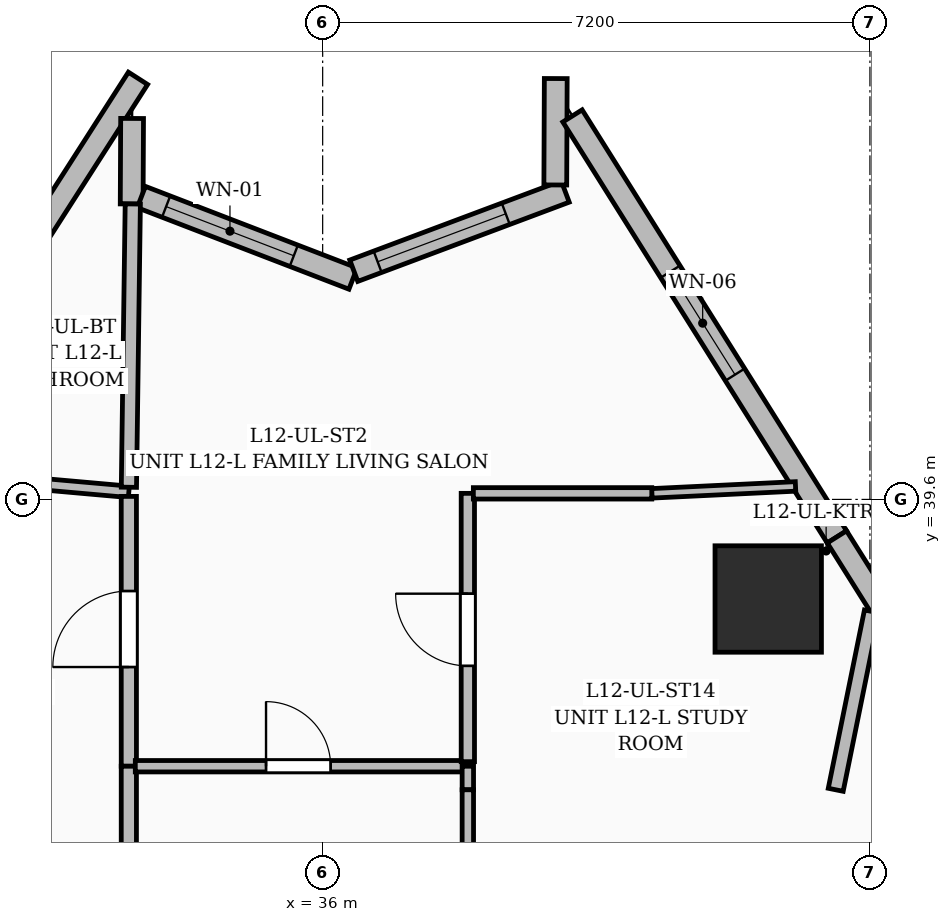
"""IFC4 building model, lengths in metres.
Left out: names, types, materials, properties, quantities, classifications, styles, units other than length and angle.
Written with IfcOpenShell. Run it as: python <this file> out.ifc"""

import sys

from ifc_helpers import new_model, si_unit, direction, frame, frame_2d, origin, origin_2d, place, context, subcontext, project, spatial, rectangle, extrude, element, fill, save


model = new_model("IFC4")
c1 = context("Model", 3, precision=1e-05, world=origin(), true_north=direction((0.0, 1.0)))
c2 = subcontext(c1, "Body", "Model", "MODEL_VIEW")
j1 = project(units=[si_unit("LENGTHUNIT", "METRE"), si_unit("PLANEANGLEUNIT", "RADIAN")], contexts=[c1])
p1 = place(None, origin())
s1 = spatial("IfcSite", under=j1, at=p1, CompositionType="ELEMENT")
p2 = place(p1, origin())
s2 = spatial("IfcBuilding", under=s1, at=p2, CompositionType="ELEMENT")
p3 = place(p2, frame((0.0, 0.0, 53.4)))
s3 = spatial("IfcBuildingStorey", under=s2, at=p3, CompositionType="ELEMENT", Elevation=53.4)
p4 = place(p3, frame((41.862, 38.29, 0.0), z_axis=(0.0, 0.0, 1.0), x_axis=(1.0, 0.0, 0.0)))
e1 = element("IfcColumn", 1, at=p4, inside=s3, PredefinedType="COLUMN", context=c2, shape_type="SweptSolid", body=[
    extrude(rectangle(XDim=1.4, YDim=1.4, at=origin_2d()), origin(), (0.0, 0.0, 1.0), 3.6),
])
p5 = place(p3, frame((29.713, 39.121, 0.0), z_axis=(0.0, 0.0, 1.0), x_axis=(0.539533296006, 0.841964264385, 0.0)))
e2 = element("IfcWall", 2, at=p5, inside=s3, PredefinedType="SOLIDWALL", context=c2, shape_type="SweptSolid", body=[
    extrude(rectangle(XDim=7.149, YDim=0.3, at=frame_2d((3.575, 0.0))), origin(), (0.0, 0.0, 1.0), 3.35),
])
p6 = place(p5, frame((2.65, 0.0, 0.6)))
e3 = element("IfcOpeningElement", 3, at=p6, cuts=e2, PredefinedType="OPENING", context=c2, shape_type="SweptSolid", body=[
    extrude(rectangle(XDim=1.5, YDim=2.1, at=frame_2d((0.75, 1.05))), frame((0.0, 0.16, 0.0), z_axis=(0.0, -1.0, 0.0), x_axis=(1.0, 0.0, 0.0)), (0.0, 0.0, 1.0), 0.32),
])
p7 = place(p3, frame((33.493, 44.612, 0.0), z_axis=(0.0, 0.0, 1.0), x_axis=(-0.004991257271, -0.999987543598, 0.0)))
e4 = element("IfcWall", 4, at=p7, inside=s3, PredefinedType="SOLIDWALL", context=c2, shape_type="SweptSolid", body=[
    extrude(rectangle(XDim=1.125, YDim=0.3, at=frame_2d((0.562, 0.0))), origin(), (0.0, 0.0, 1.0), 3.35),
])
p8 = place(p3, frame((33.614, 43.579, 0.0), z_axis=(0.0, 0.0, 1.0), x_axis=(0.933166321884, -0.359444871576, 0.0)))
e5 = element("IfcWall", 5, at=p8, inside=s3, PredefinedType="SOLIDWALL", context=c2, shape_type="SweptSolid", body=[
    extrude(rectangle(XDim=2.985, YDim=0.3, at=frame_2d((1.493, 0.0))), origin(), (0.0, 0.0, 1.0), 3.35),
])
p9 = place(p8, frame((0.35, 0.0, 0.6)))
e6 = element("IfcOpeningElement", 6, at=p9, cuts=e5, PredefinedType="OPENING", context=c2, shape_type="SweptSolid", body=[
    extrude(rectangle(XDim=1.8, YDim=2.1, at=frame_2d((0.9, 1.05))), frame((0.0, 0.16, 0.0), z_axis=(0.0, -1.0, 0.0), x_axis=(1.0, 0.0, 0.0)), (0.0, 0.0, 1.0), 0.32),
])
p10 = place(p3, frame((36.409, 42.609, 0.0), z_axis=(0.0, 0.0, 1.0), x_axis=(0.936403459864, 0.350925291699, 0.0)))
e7 = element("IfcWall", 7, at=p10, inside=s3, PredefinedType="SOLIDWALL", context=c2, shape_type="SweptSolid", body=[
    extrude(rectangle(XDim=2.971, YDim=0.3, at=frame_2d((1.485, 0.0))), origin(), (0.0, 0.0, 1.0), 3.35),
])
p11 = place(p10, frame((0.335, 0.0, 0.6)))
e8 = element("IfcOpeningElement", 8, at=p11, cuts=e7, PredefinedType="OPENING", context=c2, shape_type="SweptSolid", body=[
    extrude(rectangle(XDim=1.8, YDim=2.1, at=frame_2d((0.9, 1.05))), frame((0.0, 0.16, 0.0), z_axis=(0.0, -1.0, 0.0), x_axis=(1.0, 0.0, 0.0)), (0.0, 0.0, 1.0), 0.32),
])
p12 = place(p3, frame((39.061, 43.737, 0.0), z_axis=(0.0, 0.0, 1.0), x_axis=(0.004359916705, 0.999990495518, 0.0)))
e9 = element("IfcWall", 9, at=p12, inside=s3, PredefinedType="SOLIDWALL", context=c2, shape_type="SweptSolid", body=[
    extrude(rectangle(XDim=1.4, YDim=0.3, at=frame_2d((0.7, 0.0))), origin(), (0.0, 0.0, 1.0), 3.35),
])
p13 = place(p3, frame((39.287, 44.646, 0.0), z_axis=(0.0, 0.0, 1.0), x_axis=(0.531900124003, -0.846807096147, 0.0)))
e10 = element("IfcWall", 10, at=p13, inside=s3, PredefinedType="SOLIDWALL", context=c2, shape_type="SweptSolid", body=[
    extrude(rectangle(XDim=6.54, YDim=0.3, at=frame_2d((3.27, 0.0))), origin(), (0.0, 0.0, 1.0), 3.35),
])
p14 = place(p13, frame((2.42, 0.0, 0.55)))
e11 = element("IfcOpeningElement", 11, at=p14, cuts=e10, PredefinedType="OPENING", context=c2, shape_type="SweptSolid", body=[
    extrude(rectangle(XDim=1.6, YDim=2.2, at=frame_2d((0.8, 1.1))), frame((0.0, 0.16, 0.0), z_axis=(0.0, -1.0, 0.0), x_axis=(1.0, 0.0, 0.0)), (0.0, 0.0, 1.0), 0.32),
])
p15 = place(p3, frame((42.765, 39.107, 0.0), z_axis=(0.0, 0.0, 1.0), x_axis=(0.531921360547, -0.846793756586, 0.0)))
e12 = element("IfcWall", 12, at=p15, inside=s3, PredefinedType="SOLIDWALL", context=c2, shape_type="SweptSolid", body=[
    extrude(rectangle(XDim=7.095, YDim=0.3, at=frame_2d((3.548, 0.0))), origin(), (0.0, 0.0, 1.0), 3.35),
])
p16 = place(p15, frame((5.175, 0.0, 0.8)))
e13 = element("IfcOpeningElement", 13, at=p16, cuts=e12, PredefinedType="OPENING", context=c2, shape_type="SweptSolid", body=[
    extrude(rectangle(XDim=1.2, YDim=1.8, at=frame_2d((0.6, 0.9))), frame((0.0, 0.16, 0.0), z_axis=(0.0, -1.0, 0.0), x_axis=(1.0, 0.0, 0.0)), (0.0, 0.0, 1.0), 0.32),
])
p17 = place(p3, frame((33.45, 39.7, 0.0), z_axis=(0.0, 0.0, 1.0), x_axis=(-0.996078574379, 0.088473010928, 0.0)))
e14 = element("IfcWall", 14, at=p17, inside=s3, PredefinedType="PARTITIONING", context=c2, shape_type="SweptSolid", body=[
    extrude(rectangle(XDim=3.063, YDim=0.15, at=frame_2d((1.531, 0.0))), origin(), (0.0, 0.0, 1.0), 3.35),
])
p18 = place(p17, frame((1.178, 0.0, 0.0)))
e15 = element("IfcOpeningElement", 15, at=p18, cuts=e14, PredefinedType="OPENING", context=c2, shape_type="SweptSolid", body=[
    extrude(rectangle(XDim=0.85, YDim=2.1, at=frame_2d((0.425, 1.05))), frame((0.0, 0.085, 0.0), z_axis=(0.0, -1.0, 0.0), x_axis=(1.0, 0.0, 0.0)), (0.0, 0.0, 1.0), 0.17),
])
p19 = place(p3, frame((33.45, 36.09, 0.0), z_axis=(0.0, 0.0, 1.0), x_axis=(0.0, 1.0, 0.0)))
e16 = element("IfcWall", 16, at=p19, inside=s3, PredefinedType="PARTITIONING", context=c2, shape_type="SweptSolid", body=[
    extrude(rectangle(XDim=3.55, YDim=0.2, at=frame_2d((1.775, 0.0))), origin(), (0.0, 0.0, 1.0), 2.37),
])
p20 = place(p19, frame((1.305, 0.0, 0.0)))
e17 = element("IfcOpeningElement", 17, at=p20, cuts=e16, PredefinedType="OPENING", context=c2, shape_type="SweptSolid", body=[
    extrude(rectangle(XDim=1.0, YDim=2.2, at=frame_2d((0.5, 1.1))), frame((0.0, 0.11, 0.0), z_axis=(0.0, -1.0, 0.0), x_axis=(1.0, 0.0, 0.0)), (0.0, 0.0, 1.0), 0.22),
])
p21 = place(p3, frame((33.45, 34.927, 0.0), z_axis=(0.0, 0.0, 1.0), x_axis=(0.0, 1.0, 0.0)))
e18 = element("IfcWall", 18, at=p21, inside=s3, PredefinedType="PARTITIONING", context=c2, shape_type="SweptSolid", body=[
    extrude(rectangle(XDim=1.163, YDim=0.2, at=frame_2d((0.581, 0.0))), origin(), (0.0, 0.0, 1.0), 3.35),
])
p22 = place(p3, frame((33.451, 39.76, 0.0), z_axis=(0.0, 0.0, 1.0), x_axis=(0.013754757877, 0.999905398843, 0.0)))
e19 = element("IfcWall", 19, at=p22, inside=s3, PredefinedType="PARTITIONING", context=c2, shape_type="SweptSolid", body=[
    extrude(rectangle(XDim=3.727, YDim=0.2, at=frame_2d((1.864, 0.0))), origin(), (0.0, 0.0, 1.0), 3.35),
])
p23 = place(p3, frame((43.226, 38.126, 0.0), z_axis=(0.0, 0.0, 1.0), x_axis=(-0.198880858248, -0.980023675338, 0.0)))
e20 = element("IfcWall", 20, at=p23, inside=s3, PredefinedType="PARTITIONING", context=c2, shape_type="SweptSolid", body=[
    extrude(rectangle(XDim=2.394, YDim=0.2, at=frame_2d((1.197, 0.0))), origin(), (0.0, 0.0, 1.0), 2.37),
])
p24 = place(p3, frame((33.535, 36.09, 0.0), z_axis=(0.0, 0.0, 1.0), x_axis=(1.0, 0.0, 0.0)))
e21 = element("IfcWall", 21, at=p24, inside=s3, PredefinedType="PARTITIONING", context=c2, shape_type="SweptSolid", body=[
    extrude(rectangle(XDim=4.375, YDim=0.15, at=frame_2d((2.188, 0.0))), origin(), (0.0, 0.0, 1.0), 3.35),
])
p25 = place(p24, frame((1.72, 0.0, 0.0)))
e22 = element("IfcOpeningElement", 22, at=p25, cuts=e21, PredefinedType="OPENING", context=c2, shape_type="SweptSolid", body=[
    extrude(rectangle(XDim=0.85, YDim=2.1, at=frame_2d((0.425, 1.05))), frame((0.0, 0.085, 0.0), z_axis=(0.0, -1.0, 0.0), x_axis=(1.0, 0.0, 0.0)), (0.0, 0.0, 1.0), 0.17),
])
p26 = place(p3, frame((40.33, 39.68, 0.0), z_axis=(0.0, 0.0, 1.0), x_axis=(0.998842315683, 0.048104349096, 0.0)))
e23 = element("IfcWall", 23, at=p26, inside=s3, PredefinedType="PARTITIONING", context=c2, shape_type="SweptSolid", body=[
    extrude(rectangle(XDim=1.893, YDim=0.125, at=frame_2d((0.947, 0.0))), origin(), (0.0, 0.0, 1.0), 3.35),
])
p27 = place(p3, frame((37.91, 36.15, 0.0), z_axis=(0.0, 0.0, 1.0), x_axis=(0.0, 1.0, 0.0)))
e24 = element("IfcWall", 24, at=p27, inside=s3, PredefinedType="PARTITIONING", context=c2, shape_type="SweptSolid", body=[
    extrude(rectangle(XDim=3.53, YDim=0.175, at=frame_2d((1.765, 0.0))), origin(), (0.0, 0.0, 1.0), 2.37),
])
p28 = place(p27, frame((1.26, 0.0, 0.0)))
e25 = element("IfcOpeningElement", 25, at=p28, cuts=e24, PredefinedType="OPENING", context=c2, shape_type="SweptSolid", body=[
    extrude(rectangle(XDim=0.95, YDim=2.2, at=frame_2d((0.475, 1.1))), frame((0.0, 0.097, 0.0), z_axis=(0.0, -1.0, 0.0), x_axis=(1.0, 0.0, 0.0)), (0.0, 0.0, 1.0), 0.195),
])
p29 = place(p3, frame((37.982, 39.68, 0.0), z_axis=(0.0, 0.0, 1.0), x_axis=(1.0, 0.0, 0.0)))
e26 = element("IfcWall", 26, at=p29, inside=s3, PredefinedType="PARTITIONING", context=c2, shape_type="SweptSolid", body=[
    extrude(rectangle(XDim=2.348, YDim=0.15, at=frame_2d((1.174, 0.0))), origin(), (0.0, 0.0, 1.0), 3.35),
])
p30 = place(p3, frame((37.91, 35.78, 0.0), z_axis=(0.0, 0.0, 1.0), x_axis=(0.0, 1.0, 0.0)))
e27 = element("IfcWall", 27, at=p30, inside=s3, PredefinedType="PARTITIONING", context=c2, shape_type="SweptSolid", body=[
    extrude(rectangle(XDim=0.31, YDim=0.15, at=frame_2d((0.155, 0.0))), origin(), (0.0, 0.0, 1.0), 3.35),
])
p31 = place(p3, frame((37.91, 33.82, 0.0), z_axis=(0.0, 0.0, 1.0), x_axis=(0.0, 1.0, 0.0)))
e28 = element("IfcWall", 28, at=p31, inside=s3, PredefinedType="PARTITIONING", context=c2, shape_type="SweptSolid", body=[
    extrude(rectangle(XDim=1.96, YDim=0.15, at=frame_2d((0.98, 0.0))), origin(), (0.0, 0.0, 1.0), 3.01),
])
p32 = place(p9, origin())
e29 = element("IfcWindow", 29, at=p32, inside=s3, PartitioningType="SINGLE_PANEL", PredefinedType="WINDOW", context=c2, shape_type="SweptSolid", body=[
    extrude(rectangle(XDim=1.8, YDim=2.1, at=frame_2d((0.9, 1.05))), frame((0.0, 0.03, 0.0), z_axis=(0.0, -1.0, 0.0), x_axis=(1.0, 0.0, 0.0)), (0.0, 0.0, 1.0), 0.06),
])
fill(e6, e29)
p33 = place(p11, origin())
e30 = element("IfcWindow", 30, at=p33, inside=s3, PartitioningType="SINGLE_PANEL", PredefinedType="WINDOW", context=c2, shape_type="SweptSolid", body=[
    extrude(rectangle(XDim=1.8, YDim=2.1, at=frame_2d((0.9, 1.05))), frame((0.0, 0.03, 0.0), z_axis=(0.0, -1.0, 0.0), x_axis=(1.0, 0.0, 0.0)), (0.0, 0.0, 1.0), 0.06),
])
fill(e8, e30)
p34 = place(p14, origin())
e31 = element("IfcWindow", 31, at=p34, inside=s3, PartitioningType="SINGLE_PANEL", PredefinedType="WINDOW", context=c2, shape_type="SweptSolid", body=[
    extrude(rectangle(XDim=1.6, YDim=2.2, at=frame_2d((0.8, 1.1))), frame((0.0, 0.03, 0.0), z_axis=(0.0, -1.0, 0.0), x_axis=(1.0, 0.0, 0.0)), (0.0, 0.0, 1.0), 0.06),
])
fill(e11, e31)
p35 = place(p28, origin())
e32 = element("IfcDoor", 32, at=p35, inside=s3, OperationType="SINGLE_SWING_RIGHT", PredefinedType="DOOR", context=c2, shape_type="SweptSolid", body=[
    extrude(rectangle(XDim=0.95, YDim=2.2, at=frame_2d((0.475, 1.1))), frame((0.0, 0.025, 0.0), z_axis=(0.0, -1.0, 0.0), x_axis=(1.0, 0.0, 0.0)), (0.0, 0.0, 1.0), 0.05),
])
fill(e25, e32)
p36 = place(p25, origin())
e33 = element("IfcDoor", 33, at=p36, inside=s3, OperationType="SINGLE_SWING_LEFT", PredefinedType="DOOR", context=c2, shape_type="SweptSolid", body=[
    extrude(rectangle(XDim=0.85, YDim=2.1, at=frame_2d((0.425, 1.05))), frame((0.0, 0.025, 0.0), z_axis=(0.0, -1.0, 0.0), x_axis=(1.0, 0.0, 0.0)), (0.0, 0.0, 1.0), 0.05),
])
fill(e22, e33)
p37 = place(p20, origin())
e34 = element("IfcDoor", 34, at=p37, inside=s3, OperationType="SINGLE_SWING_LEFT", PredefinedType="DOOR", context=c2, shape_type="SweptSolid", body=[
    extrude(rectangle(XDim=1.0, YDim=2.2, at=frame_2d((0.5, 1.1))), frame((0.0, 0.025, 0.0), z_axis=(0.0, -1.0, 0.0), x_axis=(1.0, 0.0, 0.0)), (0.0, 0.0, 1.0), 0.05),
])
fill(e17, e34)
save(model, sys.argv[1])
